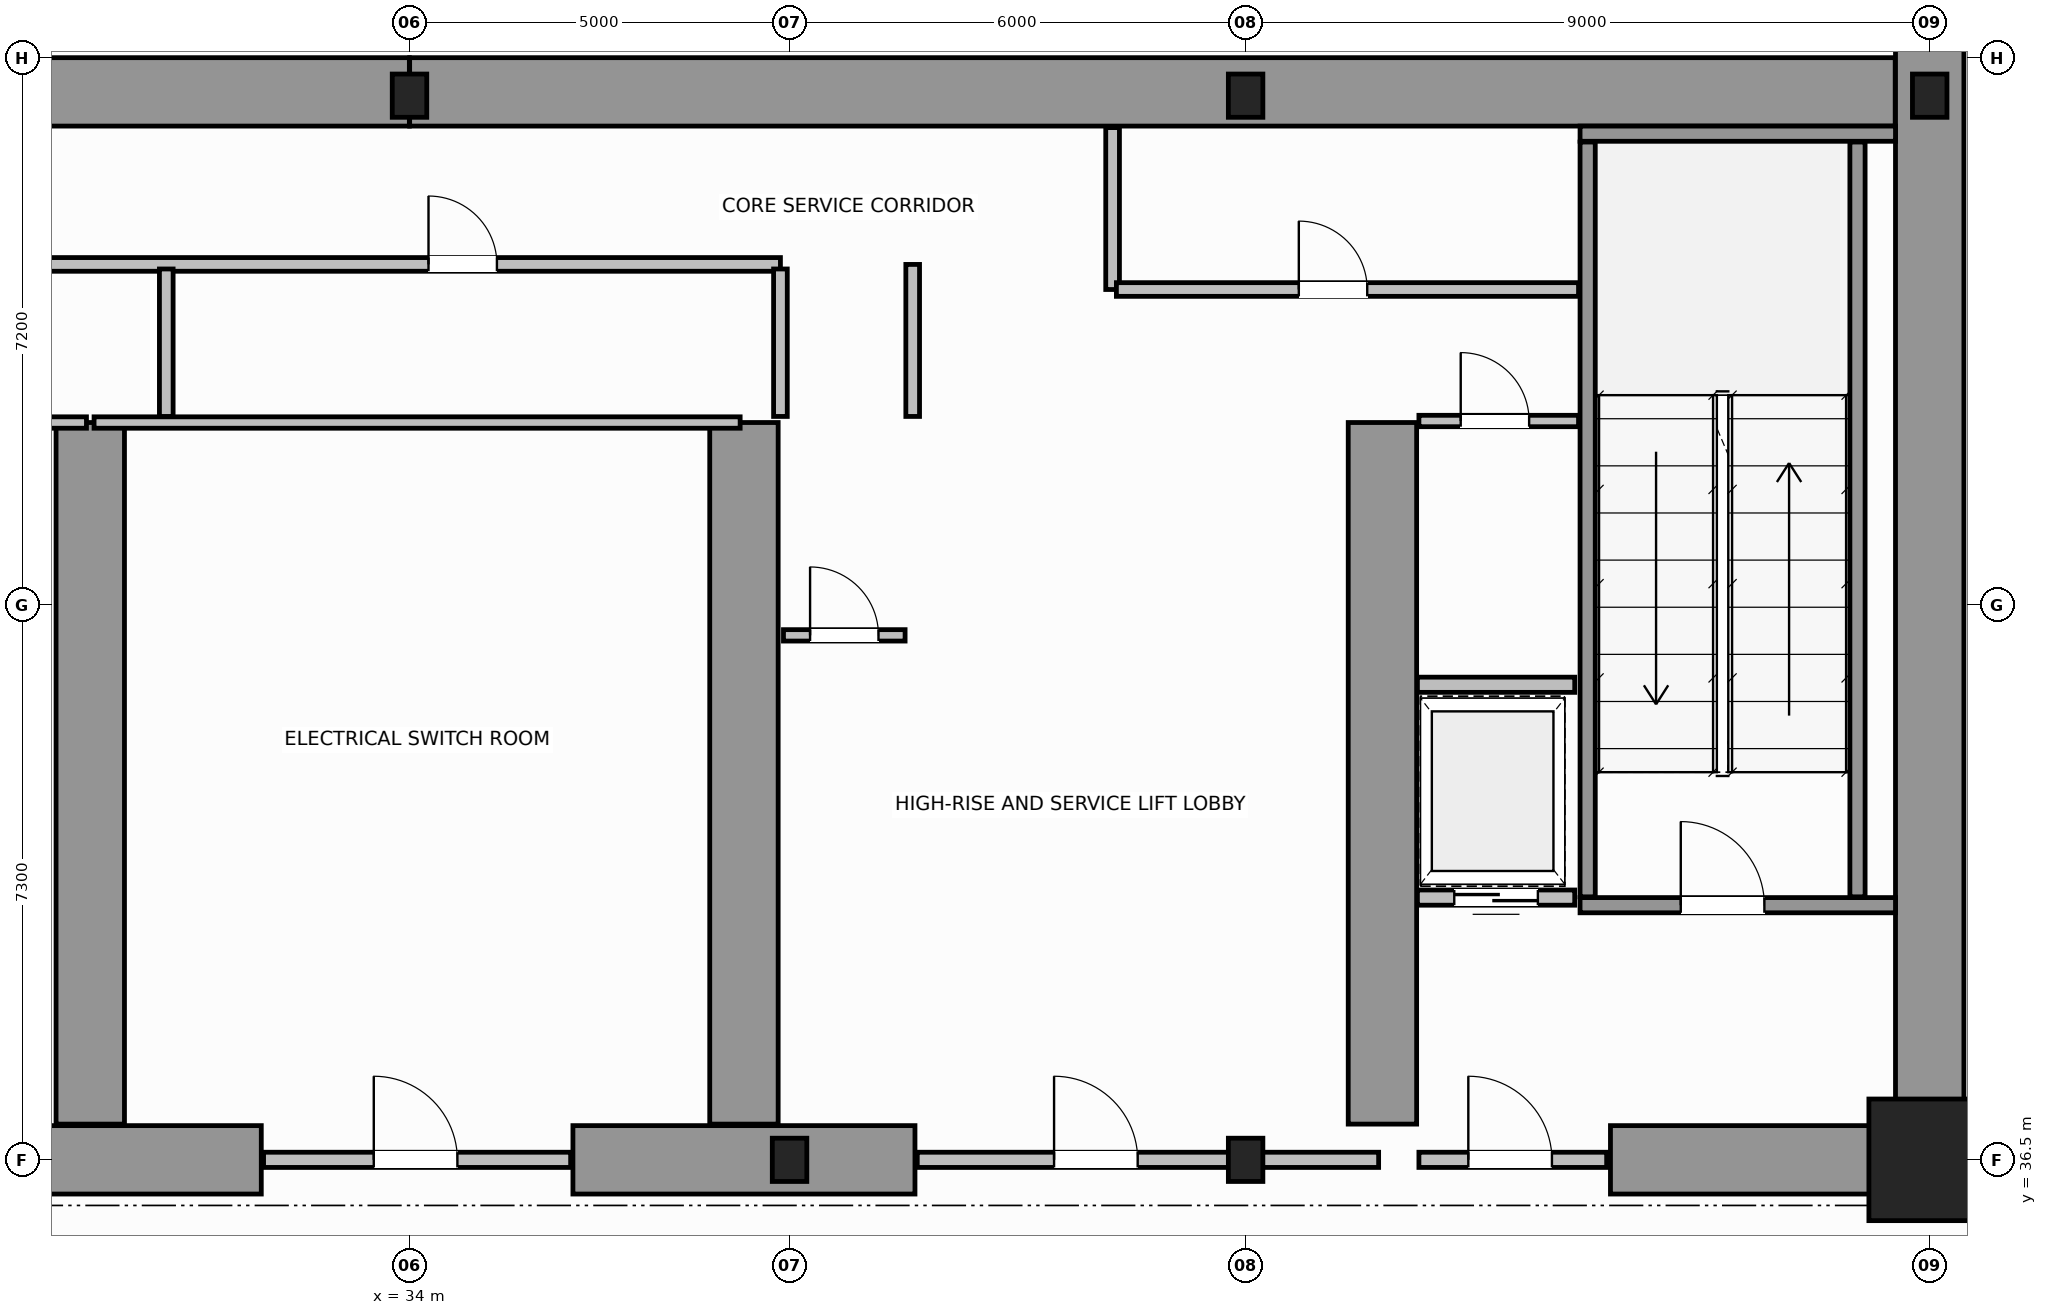
"""IFC4 building model, lengths in metres.
Left out: names, types, materials, properties, quantities, classifications, styles, units other than length and angle.
Written with IfcOpenShell. Run it as: python <this file> out.ifc"""

import sys

from ifc_helpers import new_model, si_unit, direction, frame, frame_2d, origin, origin_2d, place, context, subcontext, project, spatial, rectangle, i_section, extrude, source, transform, mapped, element, fill, save


model = new_model("IFC4")
c1 = context("Model", 3, precision=1e-05, world=origin(), true_north=direction((0.0, 1.0)))
c2 = subcontext(c1, "Body", "Model", "MODEL_VIEW")
j1 = project(units=[si_unit("LENGTHUNIT", "METRE"), si_unit("PLANEANGLEUNIT", "RADIAN")], contexts=[c1])
p1 = place(None, origin())
s1 = spatial("IfcSite", under=j1, at=p1, CompositionType="ELEMENT")
p2 = place(p1, origin())
s2 = spatial("IfcBuilding", under=s1, at=p2, CompositionType="ELEMENT")
p3 = place(p2, frame((0.0, 0.0, -5.2)))
s3 = spatial("IfcBuildingStorey", under=s2, at=p3, CompositionType="ELEMENT", Elevation=-5.2)
m1 = source(origin(), c2, "Body", "SweptSolid", [
    extrude(i_section(OverallWidth=0.454, OverallDepth=0.569, WebThickness=0.078, FlangeThickness=0.08, FilletRadius=0.015, at=origin_2d()), origin(), (0.0, 0.0, 1.0), 5.2),
])
for number, where, z_axis, x_axis in (
    (1, (39.0, 36.5, 0.0), (0.0, 0.0, 1.0), (1.0, 0.0, 0.0)),
    (2, (45.0, 36.5, 0.0), (0.0, 0.0, 1.0), (1.0, 0.0, 0.0)),
):
    element("IfcColumn", number, at=place(p3, frame(where, z_axis=z_axis, x_axis=x_axis)), inside=s3, PredefinedType="COLUMN", context=c2, shape_type="MappedRepresentation", body=[
        mapped(m1, transform((0.0, 0.0, 0.0), scale=1.0)),
    ])
m2 = source(origin(), c2, "Body", "SweptSolid", [
    extrude(rectangle(XDim=1.6, YDim=1.6, at=origin_2d()), origin(), (0.0, 0.0, 1.0), 5.2),
])
p4 = place(p3, frame((54.0, 36.5, 0.0), z_axis=(0.0, 0.0, 1.0), x_axis=(1.0, 0.0, 0.0)))
e3 = element("IfcColumn", 3, at=p4, inside=s3, PredefinedType="COLUMN", context=c2, shape_type="MappedRepresentation", body=[
    mapped(m2, transform((0.0, 0.0, 0.0), scale=1.0)),
])
for number, where, z_axis, x_axis in (
    (4, (34.0, 50.5, 0.0), (0.0, 0.0, 1.0), (1.0, 0.0, 0.0)),
    (5, (45.0, 50.5, 0.0), (0.0, 0.0, 1.0), (1.0, 0.0, 0.0)),
    (6, (54.0, 50.5, 0.0), (0.0, 0.0, 1.0), (1.0, 0.0, 0.0)),
):
    element("IfcColumn", number, at=place(p3, frame(where, z_axis=z_axis, x_axis=x_axis)), inside=s3, PredefinedType="COLUMN", context=c2, shape_type="MappedRepresentation", body=[
        mapped(m1, transform((0.0, 0.0, 0.0), scale=1.0)),
    ])
for number, where, z_axis, x_axis in (
    (7, (14.454, 50.55, 0.0), (0.0, 0.0, 1.0), (1.0, 0.0, 0.0)),
    (8, (34.002, 50.55, 0.0), (0.0, 0.0, 1.0), (1.0, 0.0, 0.0)),
):
    element("IfcWall", number, at=place(p3, frame(where, z_axis=z_axis, x_axis=x_axis)), inside=s3, PredefinedType="SHEAR", context=c2, shape_type="SweptSolid", body=[
        extrude(rectangle(XDim=19.544, YDim=0.9, at=frame_2d((9.772, 0.0))), origin(), (0.0, 0.0, 1.0), 5.2),
    ])
p5 = place(p3, frame((54.0, 36.5, 0.0), z_axis=(0.0, 0.0, 1.0), x_axis=(0.0, 1.0, 0.0)))
e9 = element("IfcWall", 9, at=p5, inside=s3, PredefinedType="SHEAR", context=c2, shape_type="SweptSolid", body=[
    extrude(rectangle(XDim=15.0, YDim=0.9, at=frame_2d((7.5, 0.0))), origin(), (0.0, 0.0, 1.0), 5.2),
])
for number, where, z_axis, x_axis in (
    (10, (27.55, 36.5, 0.0), (0.0, 0.0, 1.0), (1.0, 0.0, 0.0)),
    (11, (36.15, 36.5, 0.0), (0.0, 0.0, 1.0), (1.0, 0.0, 0.0)),
):
    element("IfcWall", number, at=place(p3, frame(where, z_axis=z_axis, x_axis=x_axis)), inside=s3, PredefinedType="SHEAR", context=c2, shape_type="SweptSolid", body=[
        extrude(rectangle(XDim=4.5, YDim=0.9, at=frame_2d((2.25, 0.0))), origin(), (0.0, 0.0, 1.0), 5.2),
    ])
p6 = place(p3, frame((49.8, 36.5, 0.0), z_axis=(0.0, 0.0, 1.0), x_axis=(1.0, 0.0, 0.0)))
e12 = element("IfcWall", 12, at=p6, inside=s3, PredefinedType="SHEAR", context=c2, shape_type="SweptSolid", body=[
    extrude(rectangle(XDim=3.73, YDim=0.9, at=frame_2d((1.865, 0.0))), origin(), (0.0, 0.0, 1.0), 3.68),
])
for number, where, z_axis, x_axis in (
    (13, (29.8, 36.97, 0.0), (0.0, 0.0, 1.0), (0.0, 1.0, 0.0)),
    (14, (38.4, 36.97, 0.0), (0.0, 0.0, 1.0), (0.0, 1.0, 0.0)),
    (15, (46.8, 36.97, 0.0), (0.0, 0.0, 1.0), (0.0, 1.0, 0.0)),
):
    element("IfcWall", number, at=place(p3, frame(where, z_axis=z_axis, x_axis=x_axis)), inside=s3, PredefinedType="SHEAR", context=c2, shape_type="SweptSolid", body=[
        extrude(rectangle(XDim=9.23, YDim=0.9, at=frame_2d((4.615, 0.0))), origin(), (0.0, 0.0, 1.0), 5.2),
    ])
p7 = place(p3, frame((49.4, 39.85, 0.0), z_axis=(0.0, 0.0, 1.0), x_axis=(1.0, 0.0, 0.0)))
e16 = element("IfcWall", 16, at=p7, inside=s3, PredefinedType="SOLIDWALL", context=c2, shape_type="SweptSolid", body=[
    extrude(rectangle(XDim=4.15, YDim=0.2, at=frame_2d((2.075, 0.0))), origin(), (0.0, 0.0, 1.0), 5.2),
])
p8 = place(p7, frame((1.325, 0.0, 0.0)))
e17 = element("IfcOpeningElement", 17, at=p8, cuts=e16, PredefinedType="OPENING", context=c2, shape_type="SweptSolid", body=[
    extrude(rectangle(XDim=1.1, YDim=2.15, at=frame_2d((0.55, 1.075))), frame((0.0, 0.11, 0.0), z_axis=(0.0, -1.0, 0.0), x_axis=(1.0, 0.0, 0.0)), (0.0, 0.0, 1.0), 0.22),
])
p9 = place(p3, frame((49.4, 50.0, 0.0), z_axis=(0.0, 0.0, 1.0), x_axis=(1.0, 0.0, 0.0)))
e18 = element("IfcWall", 18, at=p9, inside=s3, PredefinedType="SOLIDWALL", context=c2, shape_type="SweptSolid", body=[
    extrude(rectangle(XDim=4.15, YDim=0.2, at=frame_2d((2.075, 0.0))), origin(), (0.0, 0.0, 1.0), 5.2),
])
for number, where, z_axis, x_axis in (
    (19, (49.5, 39.96, 0.0), (0.0, 0.0, 1.0), (0.0, 1.0, 0.0)),
    (20, (53.05, 39.96, 0.0), (0.0, 0.0, 1.0), (0.0, 1.0, 0.0)),
):
    element("IfcWall", number, at=place(p3, frame(where, z_axis=z_axis, x_axis=x_axis)), inside=s3, PredefinedType="SOLIDWALL", context=c2, shape_type="SweptSolid", body=[
        extrude(rectangle(XDim=9.93, YDim=0.2, at=frame_2d((4.965, 0.0))), origin(), (0.0, 0.0, 1.0), 5.2),
    ])
p10 = place(p3, frame((47.28, 36.5, 0.0), z_axis=(0.0, 0.0, 1.0), x_axis=(1.0, 0.0, 0.0)))
e21 = element("IfcWall", 21, at=p10, inside=s3, PredefinedType="SOLIDWALL", context=c2, shape_type="SweptSolid", body=[
    extrude(rectangle(XDim=2.47, YDim=0.2, at=frame_2d((1.235, 0.0))), origin(), (0.0, 0.0, 1.0), 3.67),
])
p11 = place(p10, frame((0.65, 0.0, 0.0)))
e22 = element("IfcOpeningElement", 22, at=p11, cuts=e21, PredefinedType="OPENING", context=c2, shape_type="SweptSolid", body=[
    extrude(rectangle(XDim=1.1, YDim=2.15, at=frame_2d((0.55, 1.075))), frame((0.0, 0.11, 0.0), z_axis=(0.0, -1.0, 0.0), x_axis=(1.0, 0.0, 0.0)), (0.0, 0.0, 1.0), 0.22),
])
p12 = place(p3, frame((47.26, 39.95, 0.0), z_axis=(0.0, 0.0, 1.0), x_axis=(1.0, 0.0, 0.0)))
e23 = element("IfcWall", 23, at=p12, inside=s3, PredefinedType="SOLIDWALL", context=c2, shape_type="SweptSolid", body=[
    extrude(rectangle(XDim=2.07, YDim=0.2, at=frame_2d((1.035, 0.0))), origin(), (0.0, 0.0, 1.0), 4.88),
])
p13 = place(p12, frame((0.485, 0.0, 0.0)))
e24 = element("IfcOpeningElement", 24, at=p13, cuts=e23, PredefinedType="OPENING", context=c2, shape_type="SweptSolid", body=[
    extrude(rectangle(XDim=1.1, YDim=2.15, at=frame_2d((0.55, 1.075))), frame((0.0, 0.11, 0.0), z_axis=(0.0, -1.0, 0.0), x_axis=(1.0, 0.0, 0.0)), (0.0, 0.0, 1.0), 0.22),
])
p14 = place(p3, frame((47.26, 42.75, 0.0), z_axis=(0.0, 0.0, 1.0), x_axis=(1.0, 0.0, 0.0)))
e25 = element("IfcWall", 25, at=p14, inside=s3, PredefinedType="SOLIDWALL", context=c2, shape_type="SweptSolid", body=[
    extrude(rectangle(XDim=2.07, YDim=0.2, at=frame_2d((1.035, 0.0))), origin(), (0.0, 0.0, 1.0), 4.88),
])
p15 = place(p3, frame((21.25, 46.2, 0.0), z_axis=(0.0, 0.0, 1.0), x_axis=(1.0, 0.0, 0.0)))
e26 = element("IfcWall", 26, at=p15, inside=s3, PredefinedType="PARTITIONING", context=c2, shape_type="SweptSolid", body=[
    extrude(rectangle(XDim=8.5, YDim=0.15, at=frame_2d((4.25, 0.0))), origin(), (0.0, 0.0, 1.0), 4.88),
])
p16 = place(p3, frame((32.08, 36.5, 0.0), z_axis=(0.0, 0.0, 1.0), x_axis=(1.0, 0.0, 0.0)))
e27 = element("IfcWall", 27, at=p16, inside=s3, PredefinedType="SOLIDWALL", context=c2, shape_type="SweptSolid", body=[
    extrude(rectangle(XDim=4.04, YDim=0.2, at=frame_2d((2.02, 0.0))), origin(), (0.0, 0.0, 1.0), 3.96),
])
p17 = place(p16, frame((1.45, 0.0, 0.0)))
e28 = element("IfcOpeningElement", 28, at=p17, cuts=e27, PredefinedType="OPENING", context=c2, shape_type="SweptSolid", body=[
    extrude(rectangle(XDim=1.1, YDim=2.15, at=frame_2d((0.55, 1.075))), frame((0.0, 0.11, 0.0), z_axis=(0.0, -1.0, 0.0), x_axis=(1.0, 0.0, 0.0)), (0.0, 0.0, 1.0), 0.22),
])
p18 = place(p3, frame((29.85, 46.2, 0.0), z_axis=(0.0, 0.0, 1.0), x_axis=(1.0, 0.0, 0.0)))
e29 = element("IfcWall", 29, at=p18, inside=s3, PredefinedType="PARTITIONING", context=c2, shape_type="SweptSolid", body=[
    extrude(rectangle(XDim=8.5, YDim=0.15, at=frame_2d((4.25, 0.0))), origin(), (0.0, 0.0, 1.0), 4.88),
])
p19 = place(p3, frame((40.68, 36.5, 0.0), z_axis=(0.0, 0.0, 1.0), x_axis=(1.0, 0.0, 0.0)))
e30 = element("IfcWall", 30, at=p19, inside=s3, PredefinedType="SOLIDWALL", context=c2, shape_type="SweptSolid", body=[
    extrude(rectangle(XDim=6.07, YDim=0.2, at=frame_2d((3.035, 0.0))), origin(), (0.0, 0.0, 1.0), 3.67),
])
p20 = place(p19, frame((1.8, 0.0, 0.0)))
e31 = element("IfcOpeningElement", 31, at=p20, cuts=e30, PredefinedType="OPENING", context=c2, shape_type="SweptSolid", body=[
    extrude(rectangle(XDim=1.1, YDim=2.15, at=frame_2d((0.55, 1.075))), frame((0.0, 0.11, 0.0), z_axis=(0.0, -1.0, 0.0), x_axis=(1.0, 0.0, 0.0)), (0.0, 0.0, 1.0), 0.22),
])
p21 = place(p3, frame((47.28, 46.22, 0.0), z_axis=(0.0, 0.0, 1.0), x_axis=(1.0, 0.0, 0.0)))
e32 = element("IfcWall", 32, at=p21, inside=s3, PredefinedType="PARTITIONING", context=c2, shape_type="SweptSolid", body=[
    extrude(rectangle(XDim=2.1, YDim=0.15, at=frame_2d((1.05, 0.0))), origin(), (0.0, 0.0, 1.0), 4.88),
])
p22 = place(p21, frame((0.55, 0.0, 0.0)))
e33 = element("IfcOpeningElement", 33, at=p22, cuts=e32, PredefinedType="OPENING", context=c2, shape_type="SweptSolid", body=[
    extrude(rectangle(XDim=0.9, YDim=2.1, at=frame_2d((0.45, 1.05))), frame((0.0, 0.085, 0.0), z_axis=(0.0, -1.0, 0.0), x_axis=(1.0, 0.0, 0.0)), (0.0, 0.0, 1.0), 0.17),
])
p23 = place(p3, frame((38.92, 43.4, 0.0), z_axis=(0.0, 0.0, 1.0), x_axis=(1.0, 0.0, 0.0)))
e34 = element("IfcWall", 34, at=p23, inside=s3, PredefinedType="PARTITIONING", context=c2, shape_type="SweptSolid", body=[
    extrude(rectangle(XDim=1.6, YDim=0.15, at=frame_2d((0.8, 0.0))), origin(), (0.0, 0.0, 1.0), 4.88),
])
p24 = place(p23, frame((0.35, 0.0, 0.0)))
e35 = element("IfcOpeningElement", 35, at=p24, cuts=e34, PredefinedType="OPENING", context=c2, shape_type="SweptSolid", body=[
    extrude(rectangle(XDim=0.9, YDim=2.1, at=frame_2d((0.45, 1.05))), frame((0.0, 0.085, 0.0), z_axis=(0.0, -1.0, 0.0), x_axis=(1.0, 0.0, 0.0)), (0.0, 0.0, 1.0), 0.17),
])
p25 = place(p3, frame((23.85, 48.28, 0.0), z_axis=(0.0, 0.0, 1.0), x_axis=(1.0, 0.0, 0.0)))
e36 = element("IfcWall", 36, at=p25, inside=s3, PredefinedType="PLUMBINGWALL", context=c2, shape_type="SweptSolid", body=[
    extrude(rectangle(XDim=15.03, YDim=0.18, at=frame_2d((7.515, 0.0))), origin(), (0.0, 0.0, 1.0), 4.88),
])
p26 = place(p25, frame((2.9, 0.0, 0.0)))
e37 = element("IfcOpeningElement", 37, at=p26, cuts=e36, PredefinedType="OPENING", context=c2, shape_type="SweptSolid", body=[
    extrude(rectangle(XDim=0.9, YDim=2.15, at=frame_2d((0.45, 1.075))), frame((0.0, 0.1, 0.0), z_axis=(0.0, -1.0, 0.0), x_axis=(1.0, 0.0, 0.0)), (0.0, 0.0, 1.0), 0.2),
])
p27 = place(p25, frame((10.4, 0.0, 0.0)))
e38 = element("IfcOpeningElement", 38, at=p27, cuts=e36, PredefinedType="OPENING", context=c2, shape_type="SweptSolid", body=[
    extrude(rectangle(XDim=0.9, YDim=2.15, at=frame_2d((0.45, 1.075))), frame((0.0, 0.1, 0.0), z_axis=(0.0, -1.0, 0.0), x_axis=(1.0, 0.0, 0.0)), (0.0, 0.0, 1.0), 0.2),
])
for number, where, z_axis, x_axis in (
    (39, (30.8, 46.28, 0.0), (0.0, 0.0, 1.0), (0.0, 1.0, 0.0)),
    (40, (38.88, 46.28, 0.0), (0.0, 0.0, 1.0), (0.0, 1.0, 0.0)),
):
    element("IfcWall", number, at=place(p3, frame(where, z_axis=z_axis, x_axis=x_axis)), inside=s3, PredefinedType="PLUMBINGWALL", context=c2, shape_type="SweptSolid", body=[
        extrude(rectangle(XDim=1.94, YDim=0.18, at=frame_2d((0.97, 0.0))), origin(), (0.0, 0.0, 1.0), 4.88),
    ])
p28 = place(p3, frame((40.62, 46.28, 0.0), z_axis=(0.0, 0.0, 1.0), x_axis=(0.0, 1.0, 0.0)))
e41 = element("IfcWall", 41, at=p28, inside=s3, PredefinedType="PLUMBINGWALL", context=c2, shape_type="SweptSolid", body=[
    extrude(rectangle(XDim=2.0, YDim=0.18, at=frame_2d((1.0, 0.0))), origin(), (0.0, 0.0, 1.0), 4.88),
])
p29 = place(p3, frame((43.25, 47.95, 0.0), z_axis=(0.0, 0.0, 1.0), x_axis=(0.0, 1.0, 0.0)))
e42 = element("IfcWall", 42, at=p29, inside=s3, PredefinedType="PLUMBINGWALL", context=c2, shape_type="SweptSolid", body=[
    extrude(rectangle(XDim=2.13, YDim=0.18, at=frame_2d((1.065, 0.0))), origin(), (0.0, 0.0, 1.0), 4.88),
])
p30 = place(p3, frame((43.3, 47.95, 0.0), z_axis=(0.0, 0.0, 1.0), x_axis=(1.0, 0.0, 0.0)))
e43 = element("IfcWall", 43, at=p30, inside=s3, PredefinedType="PLUMBINGWALL", context=c2, shape_type="SweptSolid", body=[
    extrude(rectangle(XDim=6.08, YDim=0.18, at=frame_2d((3.04, 0.0))), origin(), (0.0, 0.0, 1.0), 4.88),
])
p31 = place(p30, frame((2.4, 0.0, 0.0)))
e44 = element("IfcOpeningElement", 44, at=p31, cuts=e43, PredefinedType="OPENING", context=c2, shape_type="SweptSolid", body=[
    extrude(rectangle(XDim=0.9, YDim=2.15, at=frame_2d((0.45, 1.075))), frame((0.0, 0.1, 0.0), z_axis=(0.0, -1.0, 0.0), x_axis=(1.0, 0.0, 0.0)), (0.0, 0.0, 1.0), 0.2),
])
m3 = source(origin(), c2, "Body", "SweptSolid", [
    extrude(rectangle(XDim=1.1, YDim=2.15, at=frame_2d((0.55, 1.075))), frame((0.0, 0.025, 0.0), z_axis=(0.0, -1.0, 0.0), x_axis=(1.0, 0.0, 0.0)), (0.0, 0.0, 1.0), 0.05),
])
p32 = place(p8, origin())
e45 = element("IfcDoor", 45, at=p32, inside=s3, OperationType="SINGLE_SWING_RIGHT", PredefinedType="DOOR", context=c2, shape_type="MappedRepresentation", body=[
    mapped(m3, transform((0.0, 0.0, 0.0), scale=1.0)),
])
fill(e17, e45)
p33 = place(p11, origin())
e46 = element("IfcDoor", 46, at=p33, inside=s3, OperationType="SINGLE_SWING_LEFT", PredefinedType="DOOR", context=c2, shape_type="MappedRepresentation", body=[
    mapped(m3, transform((0.0, 0.0, 0.0), scale=1.0)),
])
fill(e22, e46)
p34 = place(p13, origin())
e47 = element("IfcDoor", 47, at=p34, inside=s3, OperationType="DOUBLE_DOOR_SLIDING", PredefinedType="DOOR", context=c2, shape_type="MappedRepresentation", body=[
    mapped(m3, transform((0.0, 0.0, 0.0), scale=1.0)),
])
fill(e24, e47)
p35 = place(p17, origin())
e48 = element("IfcDoor", 48, at=p35, inside=s3, OperationType="SINGLE_SWING_RIGHT", PredefinedType="DOOR", context=c2, shape_type="MappedRepresentation", body=[
    mapped(m3, transform((0.0, 0.0, 0.0), scale=1.0)),
])
fill(e28, e48)
p36 = place(p20, origin())
e49 = element("IfcDoor", 49, at=p36, inside=s3, OperationType="SINGLE_SWING_LEFT", PredefinedType="DOOR", context=c2, shape_type="MappedRepresentation", body=[
    mapped(m3, transform((0.0, 0.0, 0.0), scale=1.0)),
])
fill(e31, e49)
m4 = source(origin(), c2, "Body", "SweptSolid", [
    extrude(rectangle(XDim=0.9, YDim=2.1, at=frame_2d((0.45, 1.05))), frame((0.0, 0.025, 0.0), z_axis=(0.0, -1.0, 0.0), x_axis=(1.0, 0.0, 0.0)), (0.0, 0.0, 1.0), 0.05),
])
p37 = place(p22, origin())
e50 = element("IfcDoor", 50, at=p37, inside=s3, OperationType="SINGLE_SWING_RIGHT", PredefinedType="DOOR", context=c2, shape_type="MappedRepresentation", body=[
    mapped(m4, transform((0.0, 0.0, 0.0), scale=1.0)),
])
fill(e33, e50)
p38 = place(p24, origin())
e51 = element("IfcDoor", 51, at=p38, inside=s3, OperationType="SINGLE_SWING_LEFT", PredefinedType="DOOR", context=c2, shape_type="MappedRepresentation", body=[
    mapped(m4, transform((0.0, 0.0, 0.0), scale=1.0)),
])
fill(e35, e51)
m5 = source(origin(), c2, "Body", "SweptSolid", [
    extrude(rectangle(XDim=0.9, YDim=2.15, at=frame_2d((0.45, 1.075))), frame((0.0, 0.025, 0.0), z_axis=(0.0, -1.0, 0.0), x_axis=(1.0, 0.0, 0.0)), (0.0, 0.0, 1.0), 0.05),
])
p39 = place(p27, origin())
e52 = element("IfcDoor", 52, at=p39, inside=s3, OperationType="SINGLE_SWING_LEFT", PredefinedType="DOOR", context=c2, shape_type="MappedRepresentation", body=[
    mapped(m5, transform((0.0, 0.0, 0.0), scale=1.0)),
])
fill(e38, e52)
p40 = place(p31, origin())
e53 = element("IfcDoor", 53, at=p40, inside=s3, OperationType="SINGLE_SWING_RIGHT", PredefinedType="DOOR", context=c2, shape_type="MappedRepresentation", body=[
    mapped(m5, transform((0.0, 0.0, 0.0), scale=1.0)),
])
fill(e44, e53)
save(model, sys.argv[1])
